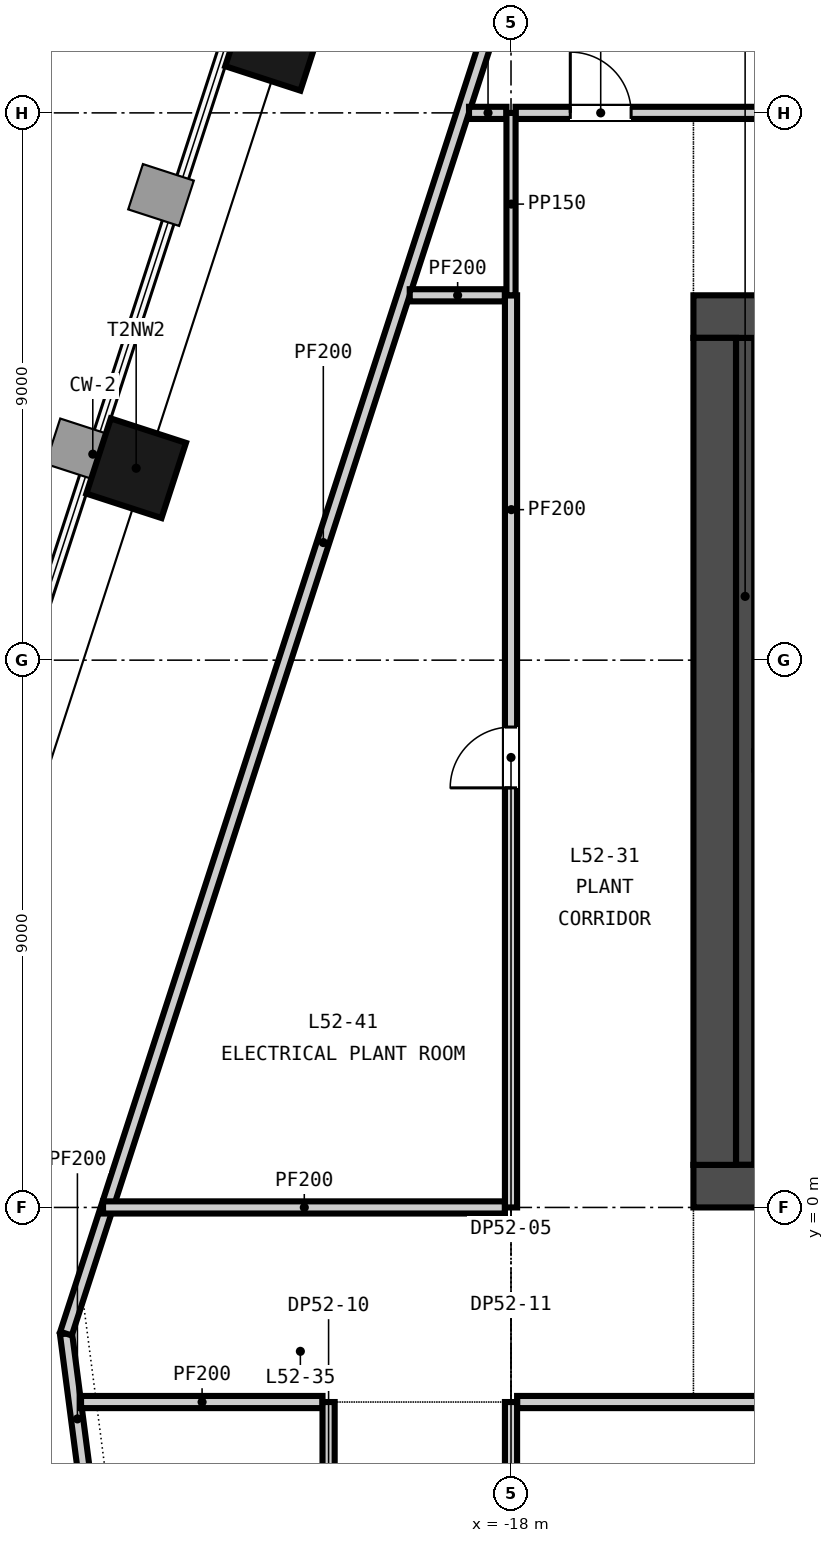
"""IFC4 building model, lengths in metres.
Left out: names, types, materials, properties, quantities, classifications, styles, units other than length and angle.
Written with IfcOpenShell. Run it as: python <this file> out.ifc"""

import sys

from ifc_helpers import new_model, si_unit, direction, frame, frame_2d, origin, origin_2d, place, context, subcontext, project, spatial, rectangle, extrude, element, fill, save


model = new_model("IFC4")
c1 = context("Model", 3, precision=1e-05, world=origin(), true_north=direction((0.0, 1.0)))
c2 = subcontext(c1, "Body", "Model", "MODEL_VIEW")
j1 = project(units=[si_unit("LENGTHUNIT", "METRE"), si_unit("PLANEANGLEUNIT", "RADIAN")], contexts=[c1])
p1 = place(None, origin())
s1 = spatial("IfcSite", under=j1, at=p1, CompositionType="ELEMENT")
p2 = place(p1, origin())
s2 = spatial("IfcBuilding", under=s1, at=p2, CompositionType="ELEMENT")
p3 = place(p2, frame((0.0, 0.0, 207.3)))
s3 = spatial("IfcBuildingStorey", under=s2, at=p3, CompositionType="ELEMENT", Elevation=207.3)
p4 = place(p3, frame((-15.0, 0.35, -0.3), z_axis=(0.0, 0.0, 1.0), x_axis=(1.0, 0.0, 0.0)))
e1 = element("IfcWall", 1, at=p4, inside=s3, PredefinedType="SOLIDWALL", context=c2, shape_type="SweptSolid", body=[
    extrude(rectangle(XDim=30.0, YDim=0.7, at=frame_2d((15.0, 0.0))), origin(), (0.0, 0.0, 1.0), 4.5),
])
p5 = place(p4, frame((5.8, 0.0, 0.3)))
e2 = element("IfcOpeningElement", 2, at=p5, cuts=e1, PredefinedType="OPENING", context=c2, shape_type="SweptSolid", body=[
    extrude(rectangle(XDim=2.4, YDim=2.4, at=frame_2d((1.2, 1.2))), frame((0.0, 0.36, 0.0), z_axis=(0.0, -1.0, 0.0), x_axis=(1.0, 0.0, 0.0)), (0.0, 0.0, 1.0), 0.72),
])
p6 = place(p4, frame((13.8, 0.0, 0.3)))
e3 = element("IfcOpeningElement", 3, at=p6, cuts=e1, PredefinedType="OPENING", context=c2, shape_type="SweptSolid", body=[
    extrude(rectangle(XDim=2.4, YDim=2.4, at=frame_2d((1.2, 1.2))), frame((0.0, 0.36, 0.0), z_axis=(0.0, -1.0, 0.0), x_axis=(1.0, 0.0, 0.0)), (0.0, 0.0, 1.0), 0.72),
])
p7 = place(p4, frame((21.8, 0.0, 0.3)))
e4 = element("IfcOpeningElement", 4, at=p7, cuts=e1, PredefinedType="OPENING", context=c2, shape_type="SweptSolid", body=[
    extrude(rectangle(XDim=2.4, YDim=2.4, at=frame_2d((1.2, 1.2))), frame((0.0, 0.36, 0.0), z_axis=(0.0, -1.0, 0.0), x_axis=(1.0, 0.0, 0.0)), (0.0, 0.0, 1.0), 0.72),
])
p8 = place(p4, frame((1.5, 0.0, 0.3)))
e5 = element("IfcOpeningElement", 5, at=p8, cuts=e1, PredefinedType="OPENING", context=c2, shape_type="SweptSolid", body=[
    extrude(rectangle(XDim=1.2, YDim=2.1, at=frame_2d((0.6, 1.05))), frame((0.0, 0.36, 0.0), z_axis=(0.0, -1.0, 0.0), x_axis=(1.0, 0.0, 0.0)), (0.0, 0.0, 1.0), 0.72),
])
p9 = place(p4, frame((27.3, 0.0, 0.3)))
e6 = element("IfcOpeningElement", 6, at=p9, cuts=e1, PredefinedType="OPENING", context=c2, shape_type="SweptSolid", body=[
    extrude(rectangle(XDim=1.2, YDim=2.1, at=frame_2d((0.6, 1.05))), frame((0.0, 0.36, 0.0), z_axis=(0.0, -1.0, 0.0), x_axis=(1.0, 0.0, 0.0)), (0.0, 0.0, 1.0), 0.72),
])
p10 = place(p3, frame((-15.0, 14.65, -0.3), z_axis=(0.0, 0.0, 1.0), x_axis=(1.0, 0.0, 0.0)))
e7 = element("IfcWall", 7, at=p10, inside=s3, PredefinedType="SOLIDWALL", context=c2, shape_type="SweptSolid", body=[
    extrude(rectangle(XDim=30.0, YDim=0.7, at=frame_2d((15.0, 0.0))), origin(), (0.0, 0.0, 1.0), 4.5),
])
p11 = place(p10, frame((9.25, 0.0, 0.3)))
e8 = element("IfcOpeningElement", 8, at=p11, cuts=e7, PredefinedType="OPENING", context=c2, shape_type="SweptSolid", body=[
    extrude(rectangle(XDim=1.5, YDim=2.1, at=frame_2d((0.75, 1.05))), frame((0.0, 0.36, 0.0), z_axis=(0.0, -1.0, 0.0), x_axis=(1.0, 0.0, 0.0)), (0.0, 0.0, 1.0), 0.72),
])
p12 = place(p10, frame((19.4, 0.0, 0.3)))
e9 = element("IfcOpeningElement", 9, at=p12, cuts=e7, PredefinedType="OPENING", context=c2, shape_type="SweptSolid", body=[
    extrude(rectangle(XDim=1.5, YDim=2.1, at=frame_2d((0.75, 1.05))), frame((0.0, 0.36, 0.0), z_axis=(0.0, -1.0, 0.0), x_axis=(1.0, 0.0, 0.0)), (0.0, 0.0, 1.0), 0.72),
])
p13 = place(p10, frame((1.5, 0.0, 0.3)))
e10 = element("IfcOpeningElement", 10, at=p13, cuts=e7, PredefinedType="OPENING", context=c2, shape_type="SweptSolid", body=[
    extrude(rectangle(XDim=1.2, YDim=2.1, at=frame_2d((0.6, 1.05))), frame((0.0, 0.36, 0.0), z_axis=(0.0, -1.0, 0.0), x_axis=(1.0, 0.0, 0.0)), (0.0, 0.0, 1.0), 0.72),
])
p14 = place(p10, frame((27.3, 0.0, 0.3)))
e11 = element("IfcOpeningElement", 11, at=p14, cuts=e7, PredefinedType="OPENING", context=c2, shape_type="SweptSolid", body=[
    extrude(rectangle(XDim=1.2, YDim=2.1, at=frame_2d((0.6, 1.05))), frame((0.0, 0.36, 0.0), z_axis=(0.0, -1.0, 0.0), x_axis=(1.0, 0.0, 0.0)), (0.0, 0.0, 1.0), 0.72),
])
p15 = place(p3, frame((-14.65, 0.7, -0.3), z_axis=(0.0, 0.0, 1.0), x_axis=(0.0, 1.0, 0.0)))
e12 = element("IfcWall", 12, at=p15, inside=s3, PredefinedType="SOLIDWALL", context=c2, shape_type="SweptSolid", body=[
    extrude(rectangle(XDim=13.6, YDim=0.7, at=frame_2d((6.8, 0.0))), origin(), (0.0, 0.0, 1.0), 4.5),
])
for number, where, z_axis, x_axis in (
    (13, (-21.881, 19.185, -0.3), (0.0, 0.0, 1.0), (-0.309, -0.951, 0.0)),
    (14, (-24.164, 12.156, -0.3), (0.0, 0.0, 1.0), (-0.309, -0.951, 0.0)),
):
    element("IfcColumn", number, at=place(p3, frame(where, z_axis=z_axis, x_axis=x_axis)), inside=s3, PredefinedType="COLUMN", context=c2, shape_type="SweptSolid", body=[
        extrude(rectangle(XDim=1.3, YDim=1.3, at=origin_2d()), origin(), (0.0, 0.0, 1.0), 4.5),
    ])
p16 = place(p3, frame((-14.15, 0.7, 0.0), z_axis=(0.0, 0.0, 1.0), x_axis=(0.0, 1.0, 0.0)))
e15 = element("IfcWall", 15, at=p16, inside=s3, PredefinedType="SOLIDWALL", context=c2, shape_type="SweptSolid", body=[
    extrude(rectangle(XDim=13.6, YDim=0.3, at=frame_2d((6.8, 0.0))), origin(), (0.0, 0.0, 1.0), 4.2),
])
p17 = place(p3, frame((-25.071, -3.2, 0.0), z_axis=(0.0, 0.0, 1.0), x_axis=(1.0, 0.0, 0.0)))
e16 = element("IfcWall", 16, at=p17, inside=s3, PredefinedType="PARTITIONING", context=c2, shape_type="SweptSolid", body=[
    extrude(rectangle(XDim=3.971, YDim=0.2, at=frame_2d((1.985, 0.0))), origin(), (0.0, 0.0, 1.0), 4.2),
])
p18 = place(p3, frame((-17.9, -3.2, 0.0), z_axis=(0.0, 0.0, 1.0), x_axis=(1.0, 0.0, 0.0)))
e17 = element("IfcWall", 17, at=p18, inside=s3, PredefinedType="PARTITIONING", context=c2, shape_type="SweptSolid", body=[
    extrude(rectangle(XDim=16.8, YDim=0.2, at=frame_2d((8.4, 0.0))), origin(), (0.0, 0.0, 1.0), 4.2),
])
p19 = place(p18, frame((12.3, 0.0, 0.0)))
e18 = element("IfcOpeningElement", 18, at=p19, cuts=e17, PredefinedType="OPENING", context=c2, shape_type="SweptSolid", body=[
    extrude(rectangle(XDim=1.0, YDim=2.1, at=frame_2d((0.5, 1.05))), frame((0.0, 0.11, 0.0), z_axis=(0.0, -1.0, 0.0), x_axis=(1.0, 0.0, 0.0)), (0.0, 0.0, 1.0), 0.22),
])
p20 = place(p3, frame((-24.709, 0.0, 0.0), z_axis=(0.0, 0.0, 1.0), x_axis=(1.0, 0.0, 0.0)))
e19 = element("IfcWall", 19, at=p20, inside=s3, PredefinedType="PARTITIONING", context=c2, shape_type="SweptSolid", body=[
    extrude(rectangle(XDim=6.609, YDim=0.2, at=frame_2d((3.305, 0.0))), origin(), (0.0, 0.0, 1.0), 4.2),
])
p21 = place(p3, frame((-19.665, 15.0, 0.0), z_axis=(0.0, 0.0, 1.0), x_axis=(1.0, 0.0, 0.0)))
e20 = element("IfcWall", 20, at=p21, inside=s3, PredefinedType="PARTITIONING", context=c2, shape_type="SweptSolid", body=[
    extrude(rectangle(XDim=1.565, YDim=0.2, at=frame_2d((0.783, 0.0))), origin(), (0.0, 0.0, 1.0), 4.2),
])
p22 = place(p3, frame((-18.691, 18.0, 0.0), z_axis=(0.0, 0.0, 1.0), x_axis=(1.0, 0.0, 0.0)))
e21 = element("IfcWall", 21, at=p22, inside=s3, PredefinedType="PARTITIONING", context=c2, shape_type="SweptSolid", body=[
    extrude(rectangle(XDim=0.616, YDim=0.2, at=frame_2d((0.308, 0.0))), origin(), (0.0, 0.0, 1.0), 4.2),
])
p23 = place(p3, frame((-17.925, 18.0, 0.0), z_axis=(0.0, 0.0, 1.0), x_axis=(1.0, 0.0, 0.0)))
e22 = element("IfcWall", 22, at=p23, inside=s3, PredefinedType="PARTITIONING", context=c2, shape_type="SweptSolid", body=[
    extrude(rectangle(XDim=33.122, YDim=0.2, at=frame_2d((16.561, 0.0))), origin(), (0.0, 0.0, 1.0), 4.2),
])
p24 = place(p23, frame((0.9, 0.0, 0.0)))
e23 = element("IfcOpeningElement", 23, at=p24, cuts=e22, PredefinedType="OPENING", context=c2, shape_type="SweptSolid", body=[
    extrude(rectangle(XDim=1.0, YDim=2.1, at=frame_2d((0.5, 1.05))), frame((0.0, 0.11, 0.0), z_axis=(0.0, -1.0, 0.0), x_axis=(1.0, 0.0, 0.0)), (0.0, 0.0, 1.0), 0.22),
])
p25 = place(p23, frame((11.109, 0.0, 0.0)))
e24 = element("IfcOpeningElement", 24, at=p25, cuts=e22, PredefinedType="OPENING", context=c2, shape_type="SweptSolid", body=[
    extrude(rectangle(XDim=1.0, YDim=2.1, at=frame_2d((0.5, 1.05))), frame((0.0, 0.11, 0.0), z_axis=(0.0, -1.0, 0.0), x_axis=(1.0, 0.0, 0.0)), (0.0, 0.0, 1.0), 0.22),
])
p26 = place(p23, frame((22.859, 0.0, 0.0)))
e25 = element("IfcOpeningElement", 25, at=p26, cuts=e22, PredefinedType="OPENING", context=c2, shape_type="SweptSolid", body=[
    extrude(rectangle(XDim=1.0, YDim=2.1, at=frame_2d((0.5, 1.05))), frame((0.0, 0.11, 0.0), z_axis=(0.0, -1.0, 0.0), x_axis=(1.0, 0.0, 0.0)), (0.0, 0.0, 1.0), 0.22),
])
p27 = place(p23, frame((30.008, 0.0, 0.0)))
e26 = element("IfcOpeningElement", 26, at=p27, cuts=e22, PredefinedType="OPENING", context=c2, shape_type="SweptSolid", body=[
    extrude(rectangle(XDim=1.0, YDim=2.1, at=frame_2d((0.5, 1.05))), frame((0.0, 0.11, 0.0), z_axis=(0.0, -1.0, 0.0), x_axis=(1.0, 0.0, 0.0)), (0.0, 0.0, 1.0), 0.22),
])
p28 = place(p3, frame((-21.0, -11.697, 0.0), z_axis=(0.0, 0.0, 1.0), x_axis=(0.0, 1.0, 0.0)))
e27 = element("IfcWall", 27, at=p28, inside=s3, PredefinedType="PARTITIONING", context=c2, shape_type="SweptSolid", body=[
    extrude(rectangle(XDim=8.497, YDim=0.2, at=frame_2d((4.249, 0.0))), origin(), (0.0, 0.0, 1.0), 4.2),
])
p29 = place(p28, frame((3.82, 0.0, 0.0)))
e28 = element("IfcOpeningElement", 28, at=p29, cuts=e27, PredefinedType="OPENING", context=c2, shape_type="SweptSolid", body=[
    extrude(rectangle(XDim=1.0, YDim=2.1, at=frame_2d((0.5, 1.05))), frame((0.0, 0.11, 0.0), z_axis=(0.0, -1.0, 0.0), x_axis=(1.0, 0.0, 0.0)), (0.0, 0.0, 1.0), 0.22),
])
p30 = place(p3, frame((-18.0, -15.5, 0.0), z_axis=(0.0, 0.0, 1.0), x_axis=(0.0, 1.0, 0.0)))
e29 = element("IfcWall", 29, at=p30, inside=s3, PredefinedType="PARTITIONING", context=c2, shape_type="SweptSolid", body=[
    extrude(rectangle(XDim=12.3, YDim=0.2, at=frame_2d((6.15, 0.0))), origin(), (0.0, 0.0, 1.0), 4.2),
])
p31 = place(p30, frame((5.65, 0.0, 0.0)))
e30 = element("IfcOpeningElement", 30, at=p31, cuts=e29, PredefinedType="OPENING", context=c2, shape_type="SweptSolid", body=[
    extrude(rectangle(XDim=1.0, YDim=2.1, at=frame_2d((0.5, 1.05))), frame((0.0, 0.11, 0.0), z_axis=(0.0, -1.0, 0.0), x_axis=(1.0, 0.0, 0.0)), (0.0, 0.0, 1.0), 0.22),
])
p32 = place(p3, frame((-18.0, 0.0, 0.0), z_axis=(0.0, 0.0, 1.0), x_axis=(0.0, 1.0, 0.0)))
e31 = element("IfcWall", 31, at=p32, inside=s3, PredefinedType="PARTITIONING", context=c2, shape_type="SweptSolid", body=[
    extrude(rectangle(XDim=15.0, YDim=0.2, at=frame_2d((7.5, 0.0))), origin(), (0.0, 0.0, 1.0), 4.2),
])
p33 = place(p32, frame((6.9, 0.0, 0.0)))
e32 = element("IfcOpeningElement", 32, at=p33, cuts=e31, PredefinedType="OPENING", context=c2, shape_type="SweptSolid", body=[
    extrude(rectangle(XDim=1.0, YDim=2.1, at=frame_2d((0.5, 1.05))), frame((0.0, 0.11, 0.0), z_axis=(0.0, -1.0, 0.0), x_axis=(1.0, 0.0, 0.0)), (0.0, 0.0, 1.0), 0.22),
])
p34 = place(p3, frame((-18.0, 15.001, 0.0), z_axis=(0.0, 0.0, 1.0), x_axis=(0.0, 1.0, 0.0)))
e33 = element("IfcWall", 33, at=p34, inside=s3, PredefinedType="PARTITIONING", context=c2, shape_type="SweptSolid", body=[
    extrude(rectangle(XDim=2.998, YDim=0.15, at=frame_2d((1.499, 0.0))), origin(), (0.0, 0.0, 1.0), 4.2),
])
p35 = place(p3, frame((-24.953, -4.88, 0.0), z_axis=(0.0, 0.0, 1.0), x_axis=(-0.129173182048, 0.991622049493, 0.0)))
e34 = element("IfcWall", 34, at=p35, inside=s3, PredefinedType="PARTITIONING", context=c2, shape_type="SweptSolid", body=[
    extrude(rectangle(XDim=2.829, YDim=0.2, at=frame_2d((1.415, 0.0))), origin(), (0.0, 0.0, 1.0), 4.2),
])
p36 = place(p3, frame((-25.318, -2.075, 0.0), z_axis=(0.0, 0.0, 1.0), x_axis=(0.309016450058, 0.951056693154, 0.0)))
e35 = element("IfcWall", 35, at=p36, inside=s3, PredefinedType="PARTITIONING", context=c2, shape_type="SweptSolid", body=[
    extrude(rectangle(XDim=27.356, YDim=0.2, at=frame_2d((13.678, 0.0))), origin(), (0.0, 0.0, 1.0), 4.2),
])
p37 = place(p24, origin())
e36 = element("IfcDoor", 36, at=p37, inside=s3, OperationType="SINGLE_SWING_LEFT", PredefinedType="DOOR", context=c2, shape_type="SweptSolid", body=[
    extrude(rectangle(XDim=1.0, YDim=2.1, at=frame_2d((0.5, 1.05))), frame((0.0, 0.025, 0.0), z_axis=(0.0, -1.0, 0.0), x_axis=(1.0, 0.0, 0.0)), (0.0, 0.0, 1.0), 0.05),
])
fill(e23, e36)
p38 = place(p33, origin())
e37 = element("IfcDoor", 37, at=p38, inside=s3, OperationType="SINGLE_SWING_LEFT", PredefinedType="DOOR", context=c2, shape_type="SweptSolid", body=[
    extrude(rectangle(XDim=1.0, YDim=2.1, at=frame_2d((0.5, 1.05))), frame((0.0, 0.025, 0.0), z_axis=(0.0, -1.0, 0.0), x_axis=(1.0, 0.0, 0.0)), (0.0, 0.0, 1.0), 0.05),
])
fill(e32, e37)
save(model, sys.argv[1])
